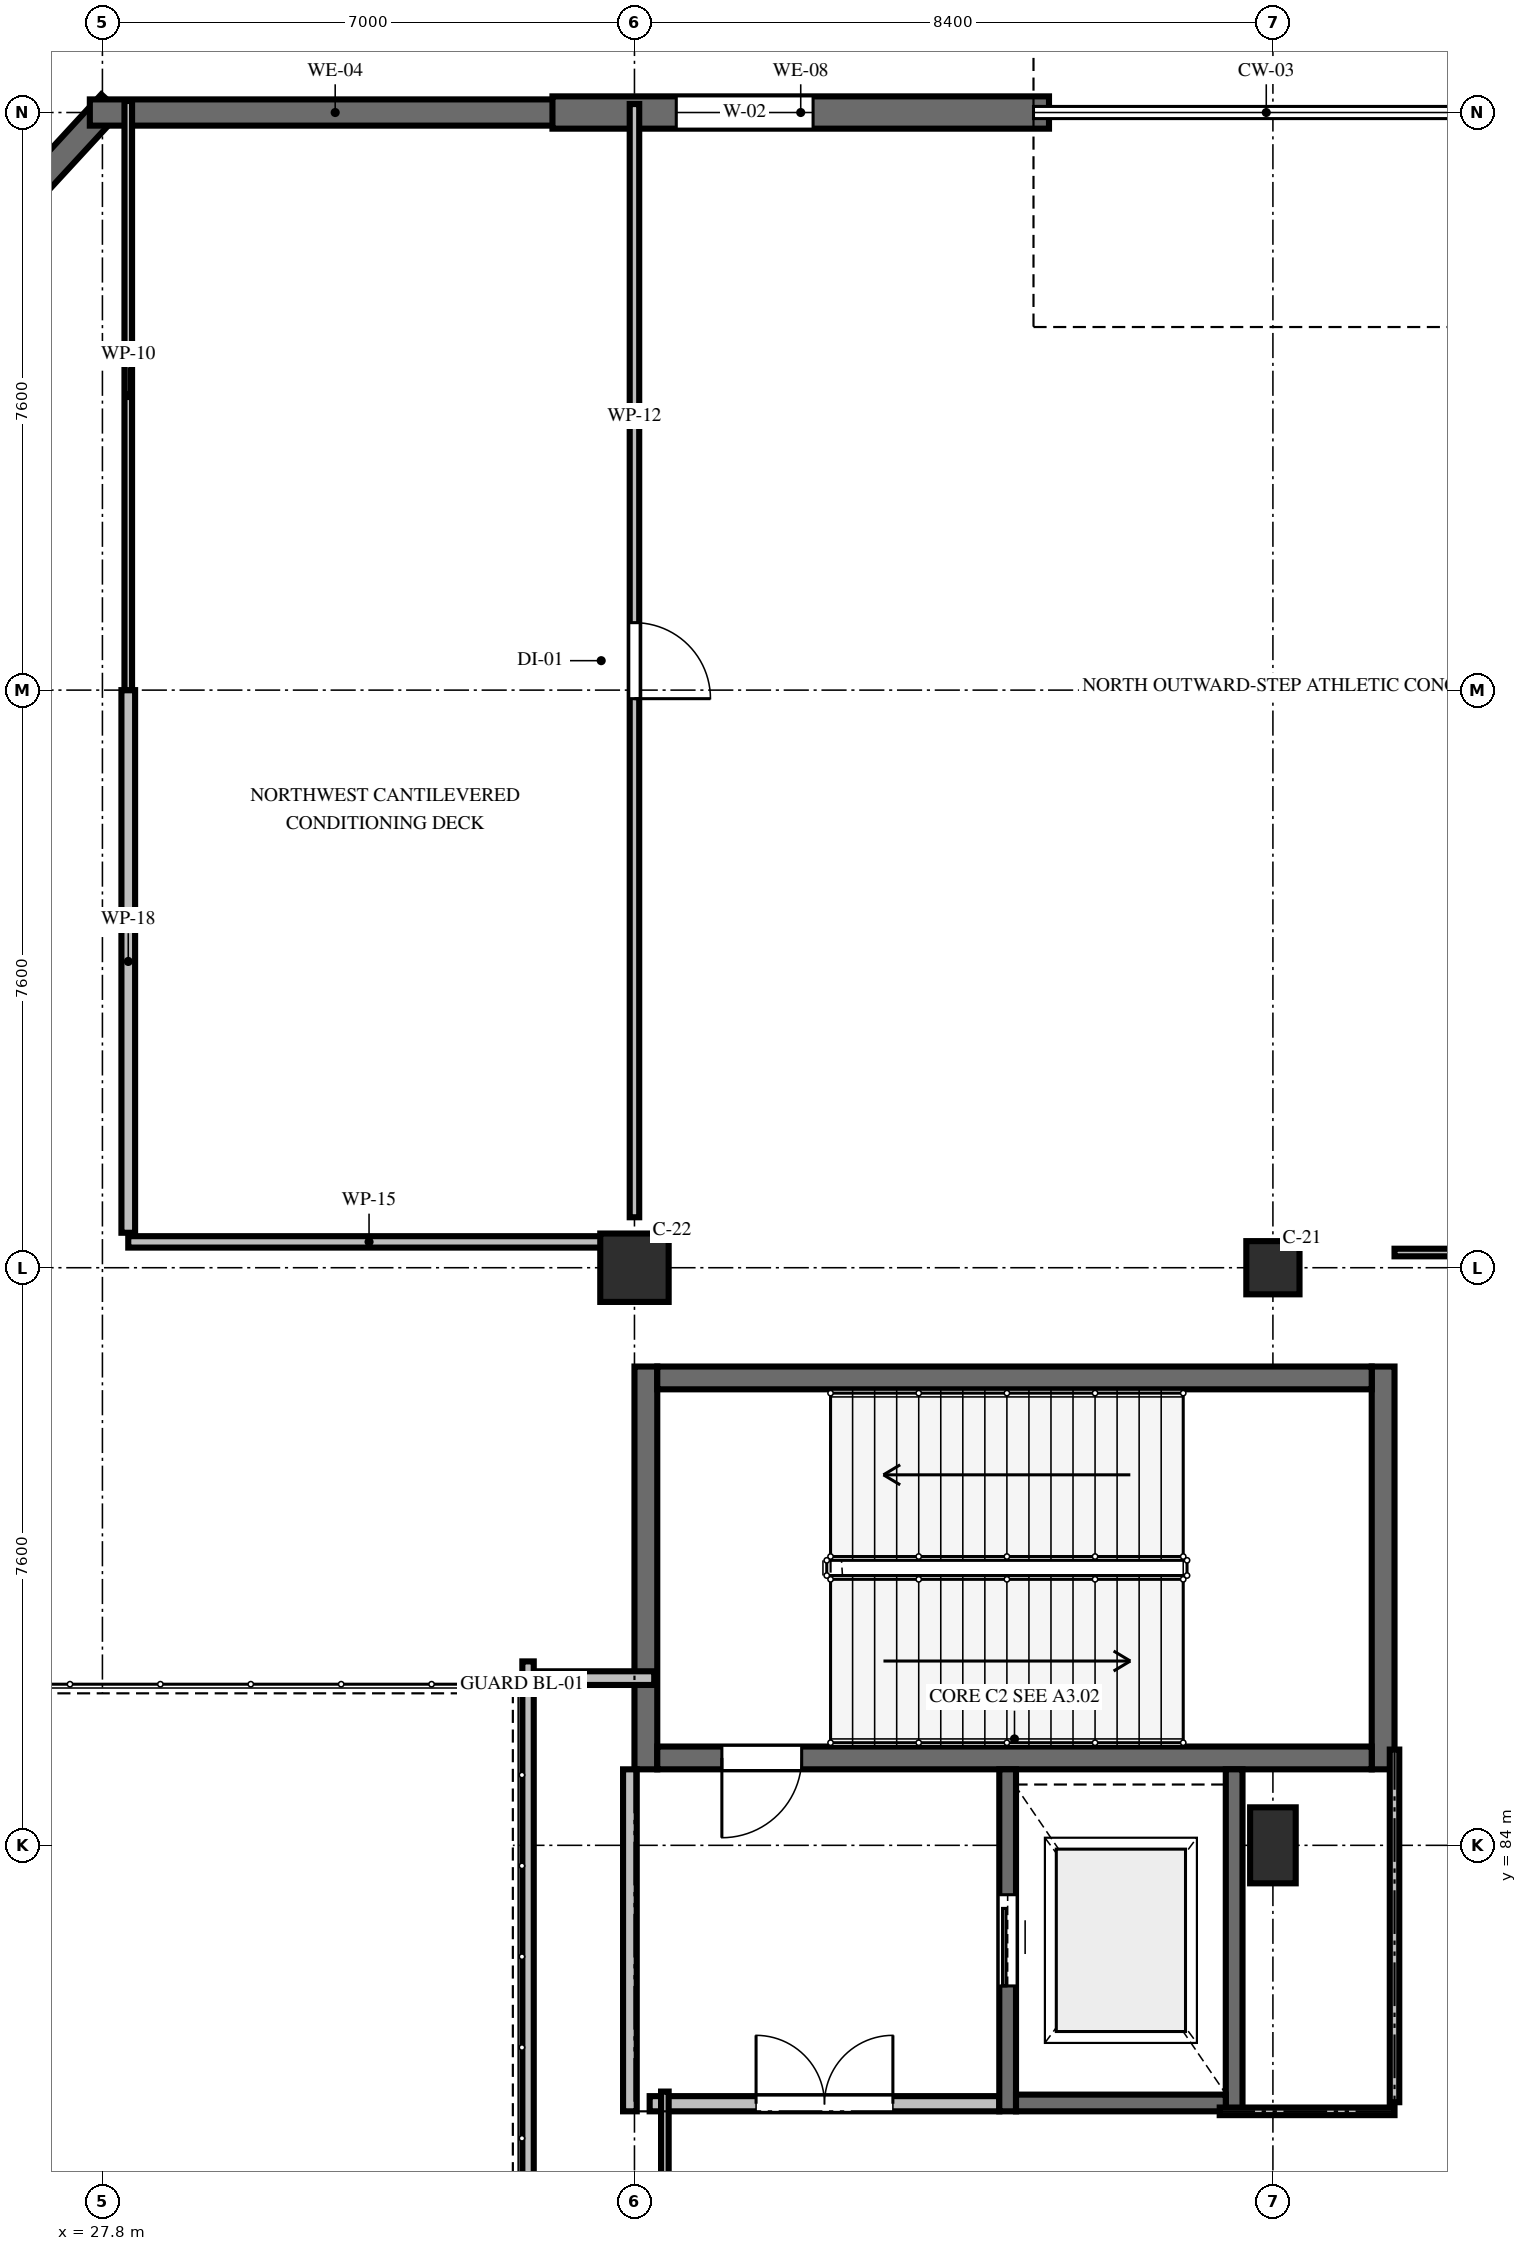
"""IFC4 building model, lengths in metres.
Left out: names, types, materials, properties, quantities, classifications, styles, units other than length and angle.
Written with IfcOpenShell. Run it as: python <this file> out.ifc"""

import sys

from ifc_helpers import new_model, si_unit, direction, frame, frame_2d, origin, origin_2d, place, context, subcontext, project, spatial, rectangle, hollow_rectangle, extrude, element, fill, save


model = new_model("IFC4")
c1 = context("Model", 3, precision=1e-05, world=origin(), true_north=direction((0.0, 1.0)))
c2 = subcontext(c1, "Body", "Model", "MODEL_VIEW")
j1 = project(units=[si_unit("LENGTHUNIT", "METRE"), si_unit("PLANEANGLEUNIT", "RADIAN")], contexts=[c1])
p1 = place(None, origin())
s1 = spatial("IfcSite", under=j1, at=p1, CompositionType="ELEMENT")
p2 = place(p1, origin())
s2 = spatial("IfcBuilding", under=s1, at=p2, CompositionType="ELEMENT")
p3 = place(p2, frame((0.0, 0.0, 10.8)))
s3 = spatial("IfcBuildingStorey", under=s2, at=p3, CompositionType="ELEMENT", Elevation=10.8)
p4 = place(p3, frame((34.8, 91.6, 0.0), z_axis=(0.0, 0.0, 1.0), x_axis=(1.0, 0.0, 0.0)))
e1 = element("IfcColumn", 1, at=p4, inside=s3, PredefinedType="COLUMN", context=c2, shape_type="SweptSolid", body=[
    extrude(hollow_rectangle(XDim=0.9, YDim=0.9, WallThickness=0.036, InnerFilletRadius=0.036, OuterFilletRadius=0.072, at=origin_2d()), origin(), (0.0, 0.0, 1.0), 6.0),
])
p5 = place(p3, frame((43.2, 84.0, 0.0), z_axis=(0.0, 0.0, 1.0), x_axis=(1.0, 0.0, 0.0)))
e2 = element("IfcColumn", 2, at=p5, inside=s3, PredefinedType="COLUMN", context=c2, shape_type="SweptSolid", body=[
    extrude(rectangle(XDim=0.6, YDim=1.0, at=origin_2d()), origin(), (0.0, 0.0, 1.0), 6.0),
])
p6 = place(p3, frame((43.2, 91.6, 0.0), z_axis=(0.0, 0.0, 1.0), x_axis=(1.0, 0.0, 0.0)))
e3 = element("IfcColumn", 3, at=p6, inside=s3, PredefinedType="COLUMN", context=c2, shape_type="SweptSolid", body=[
    extrude(hollow_rectangle(XDim=0.7, YDim=0.7, WallThickness=0.028, InnerFilletRadius=0.028, OuterFilletRadius=0.056, at=origin_2d()), origin(), (0.0, 0.0, 1.0), 6.0),
])
p7 = place(p3, frame((23.021, 101.612, 0.0), z_axis=(0.0, 0.0, 1.0), x_axis=(0.677479124988, 0.735542000979, 0.0)))
e4 = element("IfcWall", 4, at=p7, inside=s3, PredefinedType="SOLIDWALL", context=c2, shape_type="SweptSolid", body=[
    extrude(rectangle(XDim=7.219, YDim=0.345, at=frame_2d((3.61, 0.0))), origin(), (0.0, 0.0, 1.0), 5.08),
])
p8 = place(p3, frame((27.635, 106.8, 0.0), z_axis=(0.0, 0.0, 1.0), x_axis=(1.0, 0.0, 0.0)))
e5 = element("IfcWall", 5, at=p8, inside=s3, PredefinedType="SOLIDWALL", context=c2, shape_type="SweptSolid", body=[
    extrude(rectangle(XDim=6.456, YDim=0.345, at=frame_2d((3.228, 0.0))), origin(), (0.0, 0.0, 1.0), 5.08),
])
p9 = place(p3, frame((33.721, 106.8, 0.0), z_axis=(0.0, 0.0, 1.0), x_axis=(1.0, 0.0, 0.0)))
e6 = element("IfcWall", 6, at=p9, inside=s3, PredefinedType="SOLIDWALL", context=c2, shape_type="SweptSolid", body=[
    extrude(rectangle(XDim=6.533, YDim=0.425, at=frame_2d((3.267, 0.0))), origin(), (0.0, 0.0, 1.0), 5.08),
])
p10 = place(p9, frame((1.629, 0.0, 0.9)))
e7 = element("IfcOpeningElement", 7, at=p10, cuts=e6, PredefinedType="OPENING", context=c2, shape_type="SweptSolid", body=[
    extrude(rectangle(XDim=1.8, YDim=1.6, at=frame_2d((0.9, 0.8))), frame((0.0, 0.222, 0.0), z_axis=(0.0, -1.0, 0.0), x_axis=(1.0, 0.0, 0.0)), (0.0, 0.0, 1.0), 0.445),
])
for number, where, z_axis, x_axis in (
    (8, (34.95, 85.0, 0.0), (0.0, 0.0, 1.0), (0.0, 1.0, 0.0)),
    (9, (44.65, 90.3, 0.0), (0.0, 0.0, 1.0), (0.0, -1.0, 0.0)),
):
    element("IfcWall", number, at=place(p3, frame(where, z_axis=z_axis, x_axis=x_axis)), inside=s3, PredefinedType="SHEAR", context=c2, shape_type="SweptSolid", body=[
        extrude(rectangle(XDim=5.3, YDim=0.3, at=frame_2d((2.65, 0.0))), origin(), (0.0, 0.0, 1.0), 5.68),
    ])
p11 = place(p3, frame((44.5, 85.15, 0.0), z_axis=(0.0, 0.0, 1.0), x_axis=(-1.0, 0.0, 0.0)))
e10 = element("IfcWall", 10, at=p11, inside=s3, PredefinedType="SHEAR", context=c2, shape_type="SweptSolid", body=[
    extrude(rectangle(XDim=9.4, YDim=0.3, at=frame_2d((4.7, 0.0))), origin(), (0.0, 0.0, 1.0), 5.68),
])
p12 = place(p11, frame((7.5, 0.0, 0.0)))
e11 = element("IfcOpeningElement", 11, at=p12, cuts=e10, PredefinedType="OPENING", context=c2, shape_type="SweptSolid", body=[
    extrude(rectangle(XDim=1.05, YDim=2.2, at=frame_2d((0.525, 1.1))), frame((0.0, 0.16, 0.0), z_axis=(0.0, -1.0, 0.0), x_axis=(1.0, 0.0, 0.0)), (0.0, 0.0, 1.0), 0.32),
])
p13 = place(p3, frame((35.1, 90.15, 0.0), z_axis=(0.0, 0.0, 1.0), x_axis=(1.0, 0.0, 0.0)))
e12 = element("IfcWall", 12, at=p13, inside=s3, PredefinedType="SHEAR", context=c2, shape_type="SweptSolid", body=[
    extrude(rectangle(XDim=9.4, YDim=0.3, at=frame_2d((4.7, 0.0))), origin(), (0.0, 0.0, 1.0), 5.68),
])
p14 = place(p3, frame((35.0, 80.6, 0.0), z_axis=(0.0, 0.0, 1.0), x_axis=(1.0, 0.0, 0.0)))
e13 = element("IfcWall", 13, at=p14, inside=s3, PredefinedType="SOLIDWALL", context=c2, shape_type="SweptSolid", body=[
    extrude(rectangle(XDim=4.6, YDim=0.2, at=frame_2d((2.3, 0.0))), origin(), (0.0, 0.0, 1.0), 4.95),
])
p15 = place(p14, frame((1.4, 0.0, 0.0)))
e14 = element("IfcOpeningElement", 14, at=p15, cuts=e13, PredefinedType="OPENING", context=c2, shape_type="SweptSolid", body=[
    extrude(rectangle(XDim=1.8, YDim=2.2, at=frame_2d((0.9, 1.1))), frame((0.0, 0.11, 0.0), z_axis=(0.0, -1.0, 0.0), x_axis=(1.0, 0.0, 0.0)), (0.0, 0.0, 1.0), 0.22),
])
p16 = place(p3, frame((39.71, 80.5, 0.0), z_axis=(0.0, 0.0, 1.0), x_axis=(0.0, 1.0, 0.0)))
e15 = element("IfcWall", 15, at=p16, inside=s3, PredefinedType="SOLIDWALL", context=c2, shape_type="SweptSolid", body=[
    extrude(rectangle(XDim=4.5, YDim=0.22, at=frame_2d((2.25, 0.0))), origin(), (0.0, 0.0, 1.0), 5.68),
])
p17 = place(p16, frame((1.65, 0.0, 0.0)))
e16 = element("IfcOpeningElement", 16, at=p17, cuts=e15, PredefinedType="OPENING", context=c2, shape_type="SweptSolid", body=[
    extrude(rectangle(XDim=1.2, YDim=2.2, at=frame_2d((0.6, 1.1))), frame((0.0, 0.12, 0.0), z_axis=(0.0, -1.0, 0.0), x_axis=(1.0, 0.0, 0.0)), (0.0, 0.0, 1.0), 0.24),
])
p18 = place(p3, frame((42.69, 80.5, 0.0), z_axis=(0.0, 0.0, 1.0), x_axis=(0.0, 1.0, 0.0)))
e17 = element("IfcWall", 17, at=p18, inside=s3, PredefinedType="SOLIDWALL", context=c2, shape_type="SweptSolid", body=[
    extrude(rectangle(XDim=4.5, YDim=0.22, at=frame_2d((2.25, 0.0))), origin(), (0.0, 0.0, 1.0), 5.68),
])
p19 = place(p3, frame((39.82, 80.61, 0.0), z_axis=(0.0, 0.0, 1.0), x_axis=(1.0, 0.0, 0.0)))
e18 = element("IfcWall", 18, at=p19, inside=s3, PredefinedType="SOLIDWALL", context=c2, shape_type="SweptSolid", body=[
    extrude(rectangle(XDim=2.76, YDim=0.22, at=frame_2d((1.38, 0.0))), origin(), (0.0, 0.0, 1.0), 5.68),
])
p20 = place(p3, frame((34.476, 91.94, 0.0), z_axis=(0.0, 0.0, 1.0), x_axis=(-1.0, 0.0, 0.0)))
e19 = element("IfcWall", 19, at=p20, inside=s3, PredefinedType="PARTITIONING", context=c2, shape_type="SweptSolid", body=[
    extrude(rectangle(XDim=6.336, YDim=0.15, at=frame_2d((3.168, 0.0))), origin(), (0.0, 0.0, 1.0), 5.65),
])
p21 = place(p3, frame((28.14, 92.06, 0.0), z_axis=(0.0, 0.0, 1.0), x_axis=(0.0, 1.0, 0.0)))
e20 = element("IfcWall", 20, at=p21, inside=s3, PredefinedType="PARTITIONING", context=c2, shape_type="SweptSolid", body=[
    extrude(rectangle(XDim=7.14, YDim=0.18, at=frame_2d((3.57, 0.0))), origin(), (0.0, 0.0, 1.0), 5.082),
])
p22 = place(p3, frame((28.14, 99.2, 0.0), z_axis=(0.0, 0.0, 1.0), x_axis=(0.0, 1.0, 0.0)))
e21 = element("IfcWall", 21, at=p22, inside=s3, PredefinedType="PARTITIONING", context=c2, shape_type="SweptSolid", body=[
    extrude(rectangle(XDim=7.751, YDim=0.1, at=frame_2d((3.876, 0.0))), origin(), (0.0, 0.0, 1.0), 5.082),
])
p23 = place(p3, frame((34.8, 106.912, 0.0), z_axis=(0.0, 0.0, 1.0), x_axis=(0.0, -1.0, 0.0)))
e22 = element("IfcWall", 22, at=p23, inside=s3, PredefinedType="PARTITIONING", context=c2, shape_type="SweptSolid", body=[
    extrude(rectangle(XDim=14.648, YDim=0.125, at=frame_2d((7.324, 0.0))), origin(), (0.0, 0.0, 1.0), 5.082),
])
p24 = place(p23, frame((6.824, 0.0, 0.0)))
e23 = element("IfcOpeningElement", 23, at=p24, cuts=e22, PredefinedType="OPENING", context=c2, shape_type="SweptSolid", body=[
    extrude(rectangle(XDim=1.0, YDim=2.15, at=frame_2d((0.5, 1.075))), frame((0.0, 0.073, 0.0), z_axis=(0.0, -1.0, 0.0), x_axis=(1.0, 0.0, 0.0)), (0.0, 0.0, 1.0), 0.145),
])
p25 = place(p3, frame((34.74, 85.0, 0.0), z_axis=(0.0, 0.0, 1.0), x_axis=(0.0, -1.0, 0.0)))
e24 = element("IfcWall", 24, at=p25, inside=s3, PredefinedType="PARTITIONING", context=c2, shape_type="SweptSolid", body=[
    extrude(rectangle(XDim=4.5, YDim=0.18, at=frame_2d((2.25, 0.0))), origin(), (0.0, 0.0, 1.0), 4.95),
])
p26 = place(p3, frame((35.2, 80.76, 0.0), z_axis=(0.0, 0.0, 1.0), x_axis=(0.0, -1.0, 0.0)))
e25 = element("IfcWall", 25, at=p26, inside=s3, PredefinedType="PARTITIONING", context=c2, shape_type="SweptSolid", body=[
    extrude(rectangle(XDim=5.746, YDim=0.1, at=frame_2d((2.873, 0.0))), origin(), (0.0, 0.0, 1.0), 4.95),
])
p27 = place(p26, frame((2.073, 0.0, 0.0)))
e26 = element("IfcOpeningElement", 26, at=p27, cuts=e25, PredefinedType="OPENING", context=c2, shape_type="SweptSolid", body=[
    extrude(rectangle(XDim=1.6, YDim=2.2, at=frame_2d((0.8, 1.1))), frame((0.0, 0.06, 0.0), z_axis=(0.0, -1.0, 0.0), x_axis=(1.0, 0.0, 0.0)), (0.0, 0.0, 1.0), 0.12),
])
p28 = place(p3, frame((33.4, 48.02, 0.0), z_axis=(0.0, 0.0, 1.0), x_axis=(0.0, 1.0, 0.0)))
e27 = element("IfcWall", 27, at=p28, inside=s3, PredefinedType="PARTITIONING", context=c2, shape_type="SweptSolid", body=[
    extrude(rectangle(XDim=38.4, YDim=0.15, at=frame_2d((19.2, 0.0))), origin(), (0.0, 0.0, 1.0), 5.082),
])
p29 = place(p3, frame((33.52, 86.2, 0.0), z_axis=(0.0, 0.0, 1.0), x_axis=(1.0, 0.0, 0.0)))
e28 = element("IfcWall", 28, at=p29, inside=s3, PredefinedType="PARTITIONING", context=c2, shape_type="SweptSolid", body=[
    extrude(rectangle(XDim=1.54, YDim=0.18, at=frame_2d((0.77, 0.0))), origin(), (0.0, 0.0, 1.0), 4.95),
])
p30 = place(p3, frame((42.5, 80.5, 0.0), z_axis=(0.0, 0.0, 1.0), x_axis=(1.0, 0.0, 0.0)))
e29 = element("IfcWall", 29, at=p30, inside=s3, PredefinedType="PARTITIONING", context=c2, shape_type="SweptSolid", body=[
    extrude(rectangle(XDim=2.3, YDim=0.1, at=frame_2d((1.15, 0.0))), origin(), (0.0, 0.0, 1.0), 5.062),
])
p31 = place(p3, frame((44.8, 80.62, 0.0), z_axis=(0.0, 0.0, 1.0), x_axis=(0.0, 1.0, 0.0)))
e30 = element("IfcWall", 30, at=p31, inside=s3, PredefinedType="PARTITIONING", context=c2, shape_type="SweptSolid", body=[
    extrude(rectangle(XDim=4.64, YDim=0.125, at=frame_2d((2.32, 0.0))), origin(), (0.0, 0.0, 1.0), 5.162),
])
p32 = place(p3, frame((44.8, 91.8, 0.0), z_axis=(0.0, 0.0, 1.0), x_axis=(1.0, 0.0, 0.0)))
e31 = element("IfcWall", 31, at=p32, inside=s3, PredefinedType="PARTITIONING", context=c2, shape_type="SweptSolid", body=[
    extrude(rectangle(XDim=3.8, YDim=0.1, at=frame_2d((1.9, 0.0))), origin(), (0.0, 0.0, 1.0), 4.8),
])
p33 = place(p32, frame((1.1, 0.0, 0.0)))
e32 = element("IfcOpeningElement", 32, at=p33, cuts=e31, PredefinedType="OPENING", context=c2, shape_type="SweptSolid", body=[
    extrude(rectangle(XDim=1.6, YDim=2.2, at=frame_2d((0.8, 1.1))), frame((0.0, 0.06, 0.0), z_axis=(0.0, -1.0, 0.0), x_axis=(1.0, 0.0, 0.0)), (0.0, 0.0, 1.0), 0.12),
])
p34 = place(p10, origin())
e33 = element("IfcWindow", 33, at=p34, inside=s3, PartitioningType="SINGLE_PANEL", PredefinedType="WINDOW", context=c2, shape_type="SweptSolid", body=[
    extrude(rectangle(XDim=1.8, YDim=1.6, at=frame_2d((0.9, 0.8))), frame((0.0, 0.03, 0.0), z_axis=(0.0, -1.0, 0.0), x_axis=(1.0, 0.0, 0.0)), (0.0, 0.0, 1.0), 0.06),
])
fill(e7, e33)
p35 = place(p12, origin())
e34 = element("IfcDoor", 34, at=p35, inside=s3, OperationType="SINGLE_SWING_RIGHT", PredefinedType="DOOR", context=c2, shape_type="SweptSolid", body=[
    extrude(rectangle(XDim=1.05, YDim=2.2, at=frame_2d((0.525, 1.1))), frame((0.0, 0.025, 0.0), z_axis=(0.0, -1.0, 0.0), x_axis=(1.0, 0.0, 0.0)), (0.0, 0.0, 1.0), 0.05),
])
fill(e11, e34)
p36 = place(p15, origin())
e35 = element("IfcDoor", 35, at=p36, inside=s3, OperationType="DOUBLE_DOOR_SINGLE_SWING", PredefinedType="DOOR", context=c2, shape_type="SweptSolid", body=[
    extrude(rectangle(XDim=1.8, YDim=2.2, at=frame_2d((0.9, 1.1))), frame((0.0, 0.025, 0.0), z_axis=(0.0, -1.0, 0.0), x_axis=(1.0, 0.0, 0.0)), (0.0, 0.0, 1.0), 0.05),
])
fill(e14, e35)
p37 = place(p17, origin())
e36 = element("IfcDoor", 36, at=p37, inside=s3, OperationType="SLIDING_TO_LEFT", PredefinedType="DOOR", context=c2, shape_type="SweptSolid", body=[
    extrude(rectangle(XDim=1.2, YDim=2.2, at=frame_2d((0.6, 1.1))), frame((0.0, 0.025, 0.0), z_axis=(0.0, -1.0, 0.0), x_axis=(1.0, 0.0, 0.0)), (0.0, 0.0, 1.0), 0.05),
])
fill(e16, e36)
p38 = place(p24, origin())
e37 = element("IfcDoor", 37, at=p38, inside=s3, OperationType="SINGLE_SWING_RIGHT", PredefinedType="DOOR", context=c2, shape_type="SweptSolid", body=[
    extrude(rectangle(XDim=1.0, YDim=2.15, at=frame_2d((0.5, 1.075))), frame((0.0, 0.025, 0.0), z_axis=(0.0, -1.0, 0.0), x_axis=(1.0, 0.0, 0.0)), (0.0, 0.0, 1.0), 0.05),
])
fill(e23, e37)
save(model, sys.argv[1])
